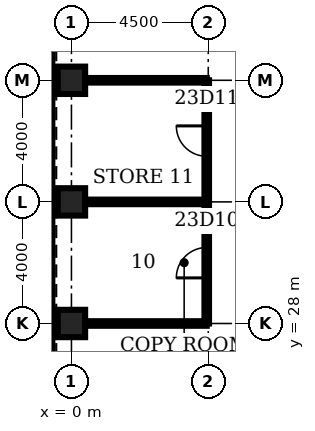
"""IFC4 building model, lengths in metres.
Left out: names, types, materials, properties, quantities, classifications, styles, units other than length and angle.
Written with IfcOpenShell. Run it as: python <this file> out.ifc"""

import sys

from ifc_helpers import new_model, si_unit, direction, frame, frame_2d, origin, origin_2d, place, context, subcontext, project, spatial, rectangle, hollow_rectangle, extrude, element, fill, save


model = new_model("IFC4")
c1 = context("Model", 3, precision=1e-05, world=origin(), true_north=direction((0.0, 1.0)))
c2 = subcontext(c1, "Body", "Model", "MODEL_VIEW")
j1 = project(units=[si_unit("LENGTHUNIT", "METRE"), si_unit("PLANEANGLEUNIT", "RADIAN")], contexts=[c1])
p1 = place(None, origin())
s1 = spatial("IfcSite", under=j1, at=p1, CompositionType="ELEMENT")
p2 = place(p1, origin())
s2 = spatial("IfcBuilding", under=s1, at=p2, CompositionType="ELEMENT")
p3 = place(p2, frame((0.0, 0.0, 108.9)))
s3 = spatial("IfcBuildingStorey", under=s2, at=p3, CompositionType="ELEMENT", Elevation=108.9)
for number, where, z_axis, x_axis in (
    (1, (0.0, 36.0, 0.0), (0.0, 0.0, 1.0), (1.0, 0.0, 0.0)),
    (2, (0.0, 32.0, 0.0), (0.0, 0.0, 1.0), (1.0, 0.0, 0.0)),
    (3, (0.0, 28.0, 0.0), (0.0, 0.0, 1.0), (1.0, 0.0, 0.0)),
):
    element("IfcColumn", number, at=place(p3, frame(where, z_axis=z_axis, x_axis=x_axis)), inside=s3, PredefinedType="COLUMN", context=c2, shape_type="SweptSolid", body=[
        extrude(hollow_rectangle(XDim=0.9, YDim=0.9, WallThickness=0.11, at=origin_2d()), origin(), (0.0, 0.0, 1.0), 4.2),
    ])
for number, where, z_axis, x_axis in (
    (4, (0.45, 28.0, 0.0), (0.0, 0.0, 1.0), (1.0, 0.0, 0.0)),
    (5, (0.45, 32.0, 0.0), (0.0, 0.0, 1.0), (1.0, 0.0, 0.0)),
    (6, (0.45, 36.0, 0.0), (0.0, 0.0, 1.0), (1.0, 0.0, 0.0)),
):
    element("IfcWall", number, at=place(p3, frame(where, z_axis=z_axis, x_axis=x_axis)), inside=s3, PredefinedType="PARTITIONING", context=c2, shape_type="SweptSolid", body=[
        extrude(rectangle(XDim=4.0, YDim=0.15, at=frame_2d((2.0, 0.0))), origin(), (0.0, 0.0, 1.0), 3.0),
    ])
p4 = place(p3, frame((4.45, 28.0, 0.0), z_axis=(0.0, 0.0, 1.0), x_axis=(0.0, 1.0, 0.0)))
e7 = element("IfcWall", 7, at=p4, inside=s3, PredefinedType="PARTITIONING", context=c2, shape_type="SweptSolid", body=[
    extrude(rectangle(XDim=8.0, YDim=0.15, at=frame_2d((4.0, 0.0))), origin(), (0.0, 0.0, 1.0), 3.0),
])
p5 = place(p4, frame((1.5, 0.0, 0.0)))
e8 = element("IfcOpeningElement", 8, at=p5, cuts=e7, PredefinedType="OPENING", context=c2, shape_type="SweptSolid", body=[
    extrude(rectangle(XDim=1.0, YDim=2.1, at=frame_2d((0.5, 1.05))), frame((0.0, 0.085, 0.0), z_axis=(0.0, -1.0, 0.0), x_axis=(1.0, 0.0, 0.0)), (0.0, 0.0, 1.0), 0.17),
])
p6 = place(p4, frame((5.5, 0.0, 0.0)))
e9 = element("IfcOpeningElement", 9, at=p6, cuts=e7, PredefinedType="OPENING", context=c2, shape_type="SweptSolid", body=[
    extrude(rectangle(XDim=1.0, YDim=2.1, at=frame_2d((0.5, 1.05))), frame((0.0, 0.085, 0.0), z_axis=(0.0, -1.0, 0.0), x_axis=(1.0, 0.0, 0.0)), (0.0, 0.0, 1.0), 0.17),
])
p7 = place(p5, origin())
e10 = element("IfcDoor", 10, at=p7, inside=s3, OperationType="SINGLE_SWING_LEFT", PredefinedType="DOOR", context=c2, shape_type="SweptSolid", body=[
    extrude(rectangle(XDim=1.0, YDim=2.1, at=frame_2d((0.5, 1.05))), frame((0.0, 0.025, 0.0), z_axis=(0.0, -1.0, 0.0), x_axis=(1.0, 0.0, 0.0)), (0.0, 0.0, 1.0), 0.05),
])
fill(e8, e10)
p8 = place(p6, origin())
e11 = element("IfcDoor", 11, at=p8, inside=s3, OperationType="SINGLE_SWING_RIGHT", PredefinedType="DOOR", context=c2, shape_type="SweptSolid", body=[
    extrude(rectangle(XDim=1.0, YDim=2.1, at=frame_2d((0.5, 1.05))), frame((0.0, 0.025, 0.0), z_axis=(0.0, -1.0, 0.0), x_axis=(1.0, 0.0, 0.0)), (0.0, 0.0, 1.0), 0.05),
])
fill(e9, e11)
save(model, sys.argv[1])
